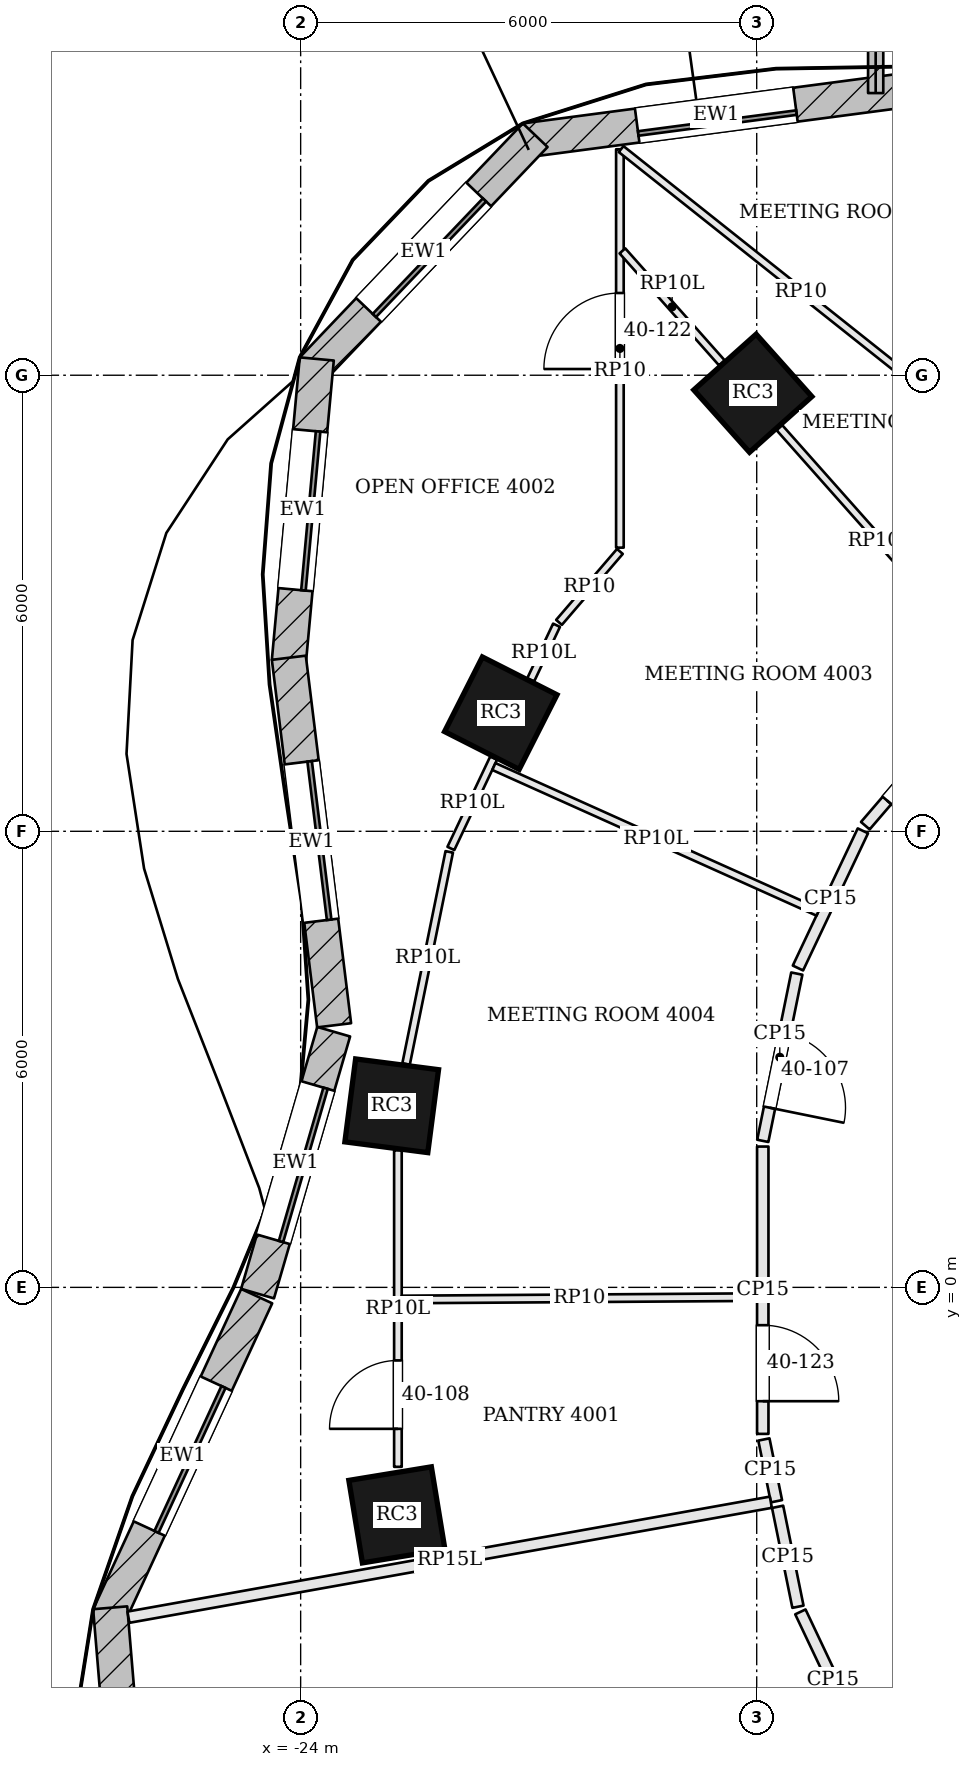
"""IFC4 building model, lengths in metres.
Left out: names, types, materials, properties, quantities, classifications, styles, units other than length and angle.
Written with IfcOpenShell. Run it as: python <this file> out.ifc"""

import sys

from ifc_helpers import new_model, si_unit, direction, frame, frame_2d, origin, origin_2d, place, context, subcontext, project, spatial, rectangle, extrude, element, fill, save


model = new_model("IFC4")
c1 = context("Model", 3, precision=1e-05, world=origin(), true_north=direction((0.0, 1.0)))
c2 = subcontext(c1, "Body", "Model", "MODEL_VIEW")
j1 = project(units=[si_unit("LENGTHUNIT", "METRE"), si_unit("PLANEANGLEUNIT", "RADIAN")], contexts=[c1])
p1 = place(None, origin())
s1 = spatial("IfcSite", under=j1, at=p1, CompositionType="ELEMENT")
p2 = place(p1, origin())
s2 = spatial("IfcBuilding", under=s1, at=p2, CompositionType="ELEMENT")
p3 = place(p2, frame((0.0, 0.0, 165.6)))
s3 = spatial("IfcBuildingStorey", under=s2, at=p3, CompositionType="ELEMENT", Elevation=165.6)
for number, where, z_axis, x_axis in (
    (1, (-18.051, 11.763, 0.0), (0.0, 0.0, 1.0), (-0.746, -0.666, 0.0)),
    (2, (-21.367, 7.554, 0.0), (0.0, 0.0, 1.0), (-0.452, -0.892, 0.0)),
    (3, (-22.802, 2.389, 0.0), (0.0, 0.0, 1.0), (-0.129, -0.992, 0.0)),
    (4, (-22.734, -2.993, 0.0), (0.0, 0.0, 1.0), (0.162, -0.987, 0.0)),
):
    element("IfcColumn", number, at=place(p3, frame(where, z_axis=z_axis, x_axis=x_axis)), inside=s3, PredefinedType="COLUMN", context=c2, shape_type="SweptSolid", body=[
        extrude(rectangle(XDim=1.1, YDim=1.1, at=origin_2d()), origin(), (0.0, 0.0, 1.0), 3.1),
    ])
p4 = place(p3, frame((-16.019, 15.753, 0.0), z_axis=(0.0, 0.0, 1.0), x_axis=(-0.991409967396, -0.130790965086, 0.0)))
e5 = element("IfcWall", 5, at=p4, inside=s3, PredefinedType="SOLIDWALL", context=c2, shape_type="SweptSolid", body=[
    extrude(rectangle(XDim=5.068, YDim=0.45, at=frame_2d((2.534, 0.0))), origin(), (0.0, 0.0, 1.0), 3.6),
])
p5 = place(p4, frame((1.484, 0.0, 0.9)))
e6 = element("IfcOpeningElement", 6, at=p5, cuts=e5, PredefinedType="OPENING", context=c2, shape_type="SweptSolid", body=[
    extrude(rectangle(XDim=2.1, YDim=1.8, at=frame_2d((1.05, 0.9))), frame((0.0, 0.235, 0.0), z_axis=(0.0, -1.0, 0.0), x_axis=(1.0, 0.0, 0.0)), (0.0, 0.0, 1.0), 0.47),
])
p6 = place(p3, frame((-20.914, 15.158, 0.0), z_axis=(0.0, 0.0, 1.0), x_axis=(-0.690057851873, -0.723754213161, 0.0)))
e7 = element("IfcWall", 7, at=p6, inside=s3, PredefinedType="SOLIDWALL", context=c2, shape_type="SweptSolid", body=[
    extrude(rectangle(XDim=4.253, YDim=0.45, at=frame_2d((2.126, 0.0))), origin(), (0.0, 0.0, 1.0), 3.6),
])
p7 = place(p6, frame((1.076, 0.0, 0.9)))
e8 = element("IfcOpeningElement", 8, at=p7, cuts=e7, PredefinedType="OPENING", context=c2, shape_type="SweptSolid", body=[
    extrude(rectangle(XDim=2.1, YDim=1.8, at=frame_2d((1.05, 0.9))), frame((0.0, 0.235, 0.0), z_axis=(0.0, -1.0, 0.0), x_axis=(1.0, 0.0, 0.0)), (0.0, 0.0, 1.0), 0.47),
])
p8 = place(p3, frame((-23.788, 12.214, 0.0), z_axis=(0.0, 0.0, 1.0), x_axis=(-0.091885237351, -0.995769603451, 0.0)))
e9 = element("IfcWall", 9, at=p8, inside=s3, PredefinedType="SOLIDWALL", context=c2, shape_type="SweptSolid", body=[
    extrude(rectangle(XDim=3.996, YDim=0.45, at=frame_2d((1.998, 0.0))), origin(), (0.0, 0.0, 1.0), 3.6),
])
p9 = place(p8, frame((0.948, 0.0, 0.9)))
e10 = element("IfcOpeningElement", 10, at=p9, cuts=e9, PredefinedType="OPENING", context=c2, shape_type="SweptSolid", body=[
    extrude(rectangle(XDim=2.1, YDim=1.8, at=frame_2d((1.05, 0.9))), frame((0.0, 0.235, 0.0), z_axis=(0.0, -1.0, 0.0), x_axis=(1.0, 0.0, 0.0)), (0.0, 0.0, 1.0), 0.47),
])
p10 = place(p3, frame((-24.156, 8.283, 0.0), z_axis=(0.0, 0.0, 1.0), x_axis=(0.122319995681, -0.992490714645, 0.0)))
e11 = element("IfcWall", 11, at=p10, inside=s3, PredefinedType="SOLIDWALL", context=c2, shape_type="SweptSolid", body=[
    extrude(rectangle(XDim=4.872, YDim=0.45, at=frame_2d((2.436, 0.0))), origin(), (0.0, 0.0, 1.0), 3.6),
])
p11 = place(p10, frame((1.386, 0.0, 0.9)))
e12 = element("IfcOpeningElement", 12, at=p11, cuts=e11, PredefinedType="OPENING", context=c2, shape_type="SweptSolid", body=[
    extrude(rectangle(XDim=2.1, YDim=1.8, at=frame_2d((1.05, 0.9))), frame((0.0, 0.235, 0.0), z_axis=(0.0, -1.0, 0.0), x_axis=(1.0, 0.0, 0.0)), (0.0, 0.0, 1.0), 0.47),
])
p12 = place(p3, frame((-23.565, 3.364, 0.0), z_axis=(0.0, 0.0, 1.0), x_axis=(-0.279148198653, -0.960248032119, 0.0)))
e13 = element("IfcWall", 13, at=p12, inside=s3, PredefinedType="SOLIDWALL", context=c2, shape_type="SweptSolid", body=[
    extrude(rectangle(XDim=3.588, YDim=0.45, at=frame_2d((1.794, 0.0))), origin(), (0.0, 0.0, 1.0), 3.6),
])
p13 = place(p12, frame((0.744, 0.0, 0.9)))
e14 = element("IfcOpeningElement", 14, at=p13, cuts=e13, PredefinedType="OPENING", context=c2, shape_type="SweptSolid", body=[
    extrude(rectangle(XDim=2.1, YDim=1.8, at=frame_2d((1.05, 0.9))), frame((0.0, 0.235, 0.0), z_axis=(0.0, -1.0, 0.0), x_axis=(1.0, 0.0, 0.0)), (0.0, 0.0, 1.0), 0.47),
])
p14 = place(p3, frame((-24.579, -0.115, 0.0), z_axis=(0.0, 0.0, 1.0), x_axis=(-0.419535648317, -0.907738861012, 0.0)))
e15 = element("IfcWall", 15, at=p14, inside=s3, PredefinedType="SOLIDWALL", context=c2, shape_type="SweptSolid", body=[
    extrude(rectangle(XDim=4.636, YDim=0.45, at=frame_2d((2.318, 0.0))), origin(), (0.0, 0.0, 1.0), 3.6),
])
p15 = place(p14, frame((1.268, 0.0, 0.9)))
e16 = element("IfcOpeningElement", 16, at=p15, cuts=e15, PredefinedType="OPENING", context=c2, shape_type="SweptSolid", body=[
    extrude(rectangle(XDim=2.1, YDim=1.8, at=frame_2d((1.05, 0.9))), frame((0.0, 0.235, 0.0), z_axis=(0.0, -1.0, 0.0), x_axis=(1.0, 0.0, 0.0)), (0.0, 0.0, 1.0), 0.47),
])
p16 = place(p3, frame((-26.506, -4.215, 0.0), z_axis=(0.0, 0.0, 1.0), x_axis=(0.083268523648, -0.996527146128, 0.0)))
e17 = element("IfcWall", 17, at=p16, inside=s3, PredefinedType="SOLIDWALL", context=c2, shape_type="SweptSolid", body=[
    extrude(rectangle(XDim=4.348, YDim=0.45, at=frame_2d((2.174, 0.0))), origin(), (0.0, 0.0, 1.0), 3.6),
])
p17 = place(p16, frame((1.124, 0.0, 0.9)))
e18 = element("IfcOpeningElement", 18, at=p17, cuts=e17, PredefinedType="OPENING", context=c2, shape_type="SweptSolid", body=[
    extrude(rectangle(XDim=2.1, YDim=1.8, at=frame_2d((1.05, 0.9))), frame((0.0, 0.235, 0.0), z_axis=(0.0, -1.0, 0.0), x_axis=(1.0, 0.0, 0.0)), (0.0, 0.0, 1.0), 0.47),
])
p18 = place(p3, frame((-16.435, 15.712, 0.0), z_axis=(0.0, 0.0, 1.0), x_axis=(0.000279017846, 0.999999961075, 0.0)))
e19 = element("IfcWall", 19, at=p18, inside=s3, PredefinedType="SOLIDWALL", context=c2, shape_type="SweptSolid", body=[
    extrude(rectangle(XDim=1.75, YDim=0.2, at=frame_2d((0.875, 0.0))), origin(), (0.0, 0.0, 1.0), 3.6),
])
p19 = place(p3, frame((-15.049, 7.847, 0.0), z_axis=(0.0, 0.0, 1.0), x_axis=(-0.651264357687, -0.758850931611, 0.0)))
e20 = element("IfcWall", 20, at=p19, inside=s3, PredefinedType="PARTITIONING", context=c2, shape_type="SweptSolid", body=[
    extrude(rectangle(XDim=2.337, YDim=0.15, at=frame_2d((1.169, 0.0))), origin(), (0.0, 0.0, 1.0), 3.098),
])
p20 = place(p19, frame((0.9, 0.0, 0.0)))
e21 = element("IfcOpeningElement", 21, at=p20, cuts=e20, PredefinedType="OPENING", context=c2, shape_type="SweptSolid", body=[
    extrude(rectangle(XDim=1.0, YDim=2.4, at=frame_2d((0.5, 1.2))), frame((0.0, 0.085, 0.0), z_axis=(0.0, -1.0, 0.0), x_axis=(1.0, 0.0, 0.0)), (0.0, 0.0, 1.0), 0.17),
])
p21 = place(p3, frame((-16.603, 6.006, 0.0), z_axis=(0.0, 0.0, 1.0), x_axis=(-0.427839289523, -0.903854823708, 0.0)))
e22 = element("IfcWall", 22, at=p21, inside=s3, PredefinedType="PARTITIONING", context=c2, shape_type="SweptSolid", body=[
    extrude(rectangle(XDim=1.997, YDim=0.15, at=frame_2d((0.998, 0.0))), origin(), (0.0, 0.0, 1.0), 3.098),
])
p22 = place(p3, frame((-17.472, 4.128, 0.0), z_axis=(0.0, 0.0, 1.0), x_axis=(-0.199502025364, -0.979897413955, 0.0)))
e23 = element("IfcWall", 23, at=p22, inside=s3, PredefinedType="PARTITIONING", context=c2, shape_type="SweptSolid", body=[
    extrude(rectangle(XDim=2.246, YDim=0.15, at=frame_2d((1.123, 0.0))), origin(), (0.0, 0.0, 1.0), 3.098),
])
p23 = place(p22, frame((0.8, 0.0, 0.0)))
e24 = element("IfcOpeningElement", 24, at=p23, cuts=e23, PredefinedType="OPENING", context=c2, shape_type="SweptSolid", body=[
    extrude(rectangle(XDim=1.0, YDim=2.4, at=frame_2d((0.5, 1.2))), frame((0.0, 0.085, 0.0), z_axis=(0.0, -1.0, 0.0), x_axis=(1.0, 0.0, 0.0)), (0.0, 0.0, 1.0), 0.17),
])
p24 = place(p3, frame((-17.92, 1.853, 0.0), z_axis=(0.0, 0.0, 1.0), x_axis=(0.0, -1.0, 0.0)))
e25 = element("IfcWall", 25, at=p24, inside=s3, PredefinedType="PARTITIONING", context=c2, shape_type="SweptSolid", body=[
    extrude(rectangle(XDim=3.78, YDim=0.15, at=frame_2d((1.89, 0.0))), origin(), (0.0, 0.0, 1.0), 3.098),
])
p25 = place(p24, frame((2.35, 0.0, 0.0)))
e26 = element("IfcOpeningElement", 26, at=p25, cuts=e25, PredefinedType="OPENING", context=c2, shape_type="SweptSolid", body=[
    extrude(rectangle(XDim=1.0, YDim=2.1, at=frame_2d((0.5, 1.05))), frame((0.0, 0.085, 0.0), z_axis=(0.0, -1.0, 0.0), x_axis=(1.0, 0.0, 0.0)), (0.0, 0.0, 1.0), 0.17),
])
p26 = place(p3, frame((-17.906, -2.001, 0.0), z_axis=(0.0, 0.0, 1.0), x_axis=(0.199625422988, -0.979872282748, 0.0)))
e27 = element("IfcWall", 27, at=p26, inside=s3, PredefinedType="PARTITIONING", context=c2, shape_type="SweptSolid", body=[
    extrude(rectangle(XDim=0.829, YDim=0.15, at=frame_2d((0.415, 0.0))), origin(), (0.0, 0.0, 1.0), 3.098),
])
p27 = place(p3, frame((-26.266, -4.339, 0.0), z_axis=(0.0, 0.0, 1.0), x_axis=(0.98435755278, 0.176182315472, 0.0)))
e28 = element("IfcWall", 28, at=p27, inside=s3, PredefinedType="PARTITIONING", context=c2, shape_type="SweptSolid", body=[
    extrude(rectangle(XDim=8.586, YDim=0.15, at=frame_2d((4.293, 0.0))), origin(), (0.0, 0.0, 1.0), 2.58),
])
p28 = place(p3, frame((-17.725, -2.887, 0.0), z_axis=(0.0, 0.0, 1.0), x_axis=(0.199475034903, -0.979902908686, 0.0)))
e29 = element("IfcWall", 29, at=p28, inside=s3, PredefinedType="PARTITIONING", context=c2, shape_type="SweptSolid", body=[
    extrude(rectangle(XDim=1.341, YDim=0.15, at=frame_2d((0.671, 0.0))), origin(), (0.0, 0.0, 1.0), 3.098),
])
p29 = place(p3, frame((-17.425, -4.269, 0.0), z_axis=(0.0, 0.0, 1.0), x_axis=(0.427886578366, -0.90383243804, 0.0)))
e30 = element("IfcWall", 30, at=p29, inside=s3, PredefinedType="PARTITIONING", context=c2, shape_type="SweptSolid", body=[
    extrude(rectangle(XDim=1.996, YDim=0.15, at=frame_2d((0.998, 0.0))), origin(), (0.0, 0.0, 1.0), 3.098),
])
p30 = place(p3, frame((-22.72, -2.361, 0.0), z_axis=(0.0, 0.0, 1.0), x_axis=(0.0, 1.0, 0.0)))
e31 = element("IfcWall", 31, at=p30, inside=s3, PredefinedType="PARTITIONING", context=c2, shape_type="SweptSolid", body=[
    extrude(rectangle(XDim=4.165, YDim=0.1, at=frame_2d((2.083, 0.0))), origin(), (0.0, 0.0, 1.0), 2.58),
])
p31 = place(p30, frame((0.5, 0.0, 0.0)))
e32 = element("IfcOpeningElement", 32, at=p31, cuts=e31, PredefinedType="OPENING", context=c2, shape_type="SweptSolid", body=[
    extrude(rectangle(XDim=0.9, YDim=2.1, at=frame_2d((0.45, 1.05))), frame((0.0, 0.06, 0.0), z_axis=(0.0, -1.0, 0.0), x_axis=(1.0, 0.0, 0.0)), (0.0, 0.0, 1.0), 0.12),
])
p32 = place(p3, frame((-22.613, 2.939, 0.0), z_axis=(0.0, 0.0, 1.0), x_axis=(0.19944591803, 0.979908835444, 0.0)))
e33 = element("IfcWall", 33, at=p32, inside=s3, PredefinedType="PARTITIONING", context=c2, shape_type="SweptSolid", body=[
    extrude(rectangle(XDim=2.847, YDim=0.1, at=frame_2d((1.424, 0.0))), origin(), (0.0, 0.0, 1.0), 2.58),
])
p33 = place(p3, frame((-22.024, 5.774, 0.0), z_axis=(0.0, 0.0, 1.0), x_axis=(0.427870793862, 0.903839910471, 0.0)))
e34 = element("IfcWall", 34, at=p33, inside=s3, PredefinedType="PARTITIONING", context=c2, shape_type="SweptSolid", body=[
    extrude(rectangle(XDim=1.315, YDim=0.1, at=frame_2d((0.657, 0.0))), origin(), (0.0, 0.0, 1.0), 2.58),
])
p34 = place(p3, frame((-20.973, 7.993, 0.0), z_axis=(0.0, 0.0, 1.0), x_axis=(0.427914425671, 0.903819254222, 0.0)))
e35 = element("IfcWall", 35, at=p34, inside=s3, PredefinedType="PARTITIONING", context=c2, shape_type="SweptSolid", body=[
    extrude(rectangle(XDim=0.794, YDim=0.1, at=frame_2d((0.397, 0.0))), origin(), (0.0, 0.0, 1.0), 2.58),
])
p35 = place(p3, frame((-20.601, 8.749, 0.0), z_axis=(0.0, 0.0, 1.0), x_axis=(0.651150974932, 0.758948224746, 0.0)))
e36 = element("IfcWall", 36, at=p35, inside=s3, PredefinedType="PARTITIONING", context=c2, shape_type="SweptSolid", body=[
    extrude(rectangle(XDim=1.23, YDim=0.1, at=frame_2d((0.615, 0.0))), origin(), (0.0, 0.0, 1.0), 3.084),
])
p36 = place(p3, frame((-19.8, 9.732, 0.0), z_axis=(0.0, 0.0, 1.0), x_axis=(0.0, 1.0, 0.0)))
e37 = element("IfcWall", 37, at=p36, inside=s3, PredefinedType="PARTITIONING", context=c2, shape_type="SweptSolid", body=[
    extrude(rectangle(XDim=5.241, YDim=0.1, at=frame_2d((2.621, 0.0))), origin(), (0.0, 0.0, 1.0), 3.084),
])
p37 = place(p36, frame((2.35, 0.0, 0.0)))
e38 = element("IfcOpeningElement", 38, at=p37, cuts=e37, PredefinedType="OPENING", context=c2, shape_type="SweptSolid", body=[
    extrude(rectangle(XDim=1.0, YDim=2.4, at=frame_2d((0.5, 1.2))), frame((0.0, 0.06, 0.0), z_axis=(0.0, -1.0, 0.0), x_axis=(1.0, 0.0, 0.0)), (0.0, 0.0, 1.0), 0.12),
])
p38 = place(p3, frame((-15.052, 11.216, 0.0), z_axis=(0.0, 0.0, 1.0), x_axis=(-0.782929703911, 0.622110182149, 0.0)))
e39 = element("IfcWall", 39, at=p38, inside=s3, PredefinedType="PARTITIONING", context=c2, shape_type="SweptSolid", body=[
    extrude(rectangle(XDim=6.043, YDim=0.1, at=frame_2d((3.022, 0.0))), origin(), (0.0, 0.0, 1.0), 3.084),
])
p39 = place(p3, frame((-15.05, 8.324, 0.0), z_axis=(0.0, 0.0, 1.0), x_axis=(-0.663995746483, 0.747736349694, 0.0)))
e40 = element("IfcWall", 40, at=p39, inside=s3, PredefinedType="PARTITIONING", context=c2, shape_type="SweptSolid", body=[
    extrude(rectangle(XDim=3.994, YDim=0.1, at=frame_2d((1.997, 0.0))), origin(), (0.0, 0.0, 1.0), 2.58),
])
p40 = place(p3, frame((-18.459, 12.163, 0.0), z_axis=(0.0, 0.0, 1.0), x_axis=(-0.664040692512, 0.74769643485, 0.0)))
e41 = element("IfcWall", 41, at=p40, inside=s3, PredefinedType="PARTITIONING", context=c2, shape_type="SweptSolid", body=[
    extrude(rectangle(XDim=1.97, YDim=0.1, at=frame_2d((0.985, 0.0))), origin(), (0.0, 0.0, 1.0), 2.58),
])
p41 = place(p3, frame((-17.193, 4.936, 0.0), z_axis=(0.0, 0.0, 1.0), x_axis=(-0.912146065202, 0.409865289744, 0.0)))
e42 = element("IfcWall", 42, at=p41, inside=s3, PredefinedType="PARTITIONING", context=c2, shape_type="SweptSolid", body=[
    extrude(rectangle(XDim=4.676, YDim=0.1, at=frame_2d((2.338, 0.0))), origin(), (0.0, 0.0, 1.0), 2.58),
])
p42 = place(p3, frame((-17.995, -0.128, 0.0), z_axis=(0.0, 0.0, 1.0), x_axis=(-0.999978007686, -0.006632054257, 0.0)))
e43 = element("IfcWall", 43, at=p42, inside=s3, PredefinedType="PARTITIONING", context=c2, shape_type="SweptSolid", body=[
    extrude(rectangle(XDim=4.675, YDim=0.1, at=frame_2d((2.337, 0.0))), origin(), (0.0, 0.0, 1.0), 3.084),
])
p43 = place(p5, origin())
e44 = element("IfcWindow", 44, at=p43, inside=s3, PartitioningType="SINGLE_PANEL", PredefinedType="WINDOW", context=c2, shape_type="SweptSolid", body=[
    extrude(rectangle(XDim=2.1, YDim=1.8, at=frame_2d((1.05, 0.9))), frame((0.0, 0.135, 0.0), z_axis=(0.0, -1.0, 0.0), x_axis=(1.0, 0.0, 0.0)), (0.0, 0.0, 1.0), 0.06),
])
fill(e6, e44)
p44 = place(p7, origin())
e45 = element("IfcWindow", 45, at=p44, inside=s3, PartitioningType="SINGLE_PANEL", PredefinedType="WINDOW", context=c2, shape_type="SweptSolid", body=[
    extrude(rectangle(XDim=2.1, YDim=1.8, at=frame_2d((1.05, 0.9))), frame((0.0, 0.135, 0.0), z_axis=(0.0, -1.0, 0.0), x_axis=(1.0, 0.0, 0.0)), (0.0, 0.0, 1.0), 0.06),
])
fill(e8, e45)
p45 = place(p9, origin())
e46 = element("IfcWindow", 46, at=p45, inside=s3, PartitioningType="SINGLE_PANEL", PredefinedType="WINDOW", context=c2, shape_type="SweptSolid", body=[
    extrude(rectangle(XDim=2.1, YDim=1.8, at=frame_2d((1.05, 0.9))), frame((0.0, 0.135, 0.0), z_axis=(0.0, -1.0, 0.0), x_axis=(1.0, 0.0, 0.0)), (0.0, 0.0, 1.0), 0.06),
])
fill(e10, e46)
p46 = place(p11, origin())
e47 = element("IfcWindow", 47, at=p46, inside=s3, PartitioningType="SINGLE_PANEL", PredefinedType="WINDOW", context=c2, shape_type="SweptSolid", body=[
    extrude(rectangle(XDim=2.1, YDim=1.8, at=frame_2d((1.05, 0.9))), frame((0.0, 0.135, 0.0), z_axis=(0.0, -1.0, 0.0), x_axis=(1.0, 0.0, 0.0)), (0.0, 0.0, 1.0), 0.06),
])
fill(e12, e47)
p47 = place(p13, origin())
e48 = element("IfcWindow", 48, at=p47, inside=s3, PartitioningType="SINGLE_PANEL", PredefinedType="WINDOW", context=c2, shape_type="SweptSolid", body=[
    extrude(rectangle(XDim=2.1, YDim=1.8, at=frame_2d((1.05, 0.9))), frame((0.0, 0.135, 0.0), z_axis=(0.0, -1.0, 0.0), x_axis=(1.0, 0.0, 0.0)), (0.0, 0.0, 1.0), 0.06),
])
fill(e14, e48)
p48 = place(p15, origin())
e49 = element("IfcWindow", 49, at=p48, inside=s3, PartitioningType="SINGLE_PANEL", PredefinedType="WINDOW", context=c2, shape_type="SweptSolid", body=[
    extrude(rectangle(XDim=2.1, YDim=1.8, at=frame_2d((1.05, 0.9))), frame((0.0, 0.135, 0.0), z_axis=(0.0, -1.0, 0.0), x_axis=(1.0, 0.0, 0.0)), (0.0, 0.0, 1.0), 0.06),
])
fill(e16, e49)
p49 = place(p20, origin())
e50 = element("IfcDoor", 50, at=p49, inside=s3, OperationType="SINGLE_SWING_RIGHT", PredefinedType="DOOR", context=c2, shape_type="SweptSolid", body=[
    extrude(rectangle(XDim=1.0, YDim=2.4, at=frame_2d((0.5, 1.2))), frame((0.0, 0.025, 0.0), z_axis=(0.0, -1.0, 0.0), x_axis=(1.0, 0.0, 0.0)), (0.0, 0.0, 1.0), 0.05),
])
fill(e21, e50)
p50 = place(p23, origin())
e51 = element("IfcDoor", 51, at=p50, inside=s3, OperationType="SINGLE_SWING_RIGHT", PredefinedType="DOOR", context=c2, shape_type="SweptSolid", body=[
    extrude(rectangle(XDim=1.0, YDim=2.4, at=frame_2d((0.5, 1.2))), frame((0.0, 0.025, 0.0), z_axis=(0.0, -1.0, 0.0), x_axis=(1.0, 0.0, 0.0)), (0.0, 0.0, 1.0), 0.05),
])
fill(e24, e51)
p51 = place(p31, origin())
e52 = element("IfcDoor", 52, at=p51, inside=s3, OperationType="SINGLE_SWING_LEFT", PredefinedType="DOOR", context=c2, shape_type="SweptSolid", body=[
    extrude(rectangle(XDim=0.9, YDim=2.1, at=frame_2d((0.45, 1.05))), frame((0.0, 0.025, 0.0), z_axis=(0.0, -1.0, 0.0), x_axis=(1.0, 0.0, 0.0)), (0.0, 0.0, 1.0), 0.05),
])
fill(e32, e52)
p52 = place(p37, origin())
e53 = element("IfcDoor", 53, at=p52, inside=s3, OperationType="SINGLE_SWING_LEFT", PredefinedType="DOOR", context=c2, shape_type="SweptSolid", body=[
    extrude(rectangle(XDim=1.0, YDim=2.4, at=frame_2d((0.5, 1.2))), frame((0.0, 0.025, 0.0), z_axis=(0.0, -1.0, 0.0), x_axis=(1.0, 0.0, 0.0)), (0.0, 0.0, 1.0), 0.05),
])
fill(e38, e53)
p53 = place(p25, origin())
e54 = element("IfcDoor", 54, at=p53, inside=s3, OperationType="SINGLE_SWING_RIGHT", PredefinedType="DOOR", context=c2, shape_type="SweptSolid", body=[
    extrude(rectangle(XDim=1.0, YDim=2.1, at=frame_2d((0.5, 1.05))), frame((0.0, 0.025, 0.0), z_axis=(0.0, -1.0, 0.0), x_axis=(1.0, 0.0, 0.0)), (0.0, 0.0, 1.0), 0.05),
])
fill(e26, e54)
save(model, sys.argv[1])
